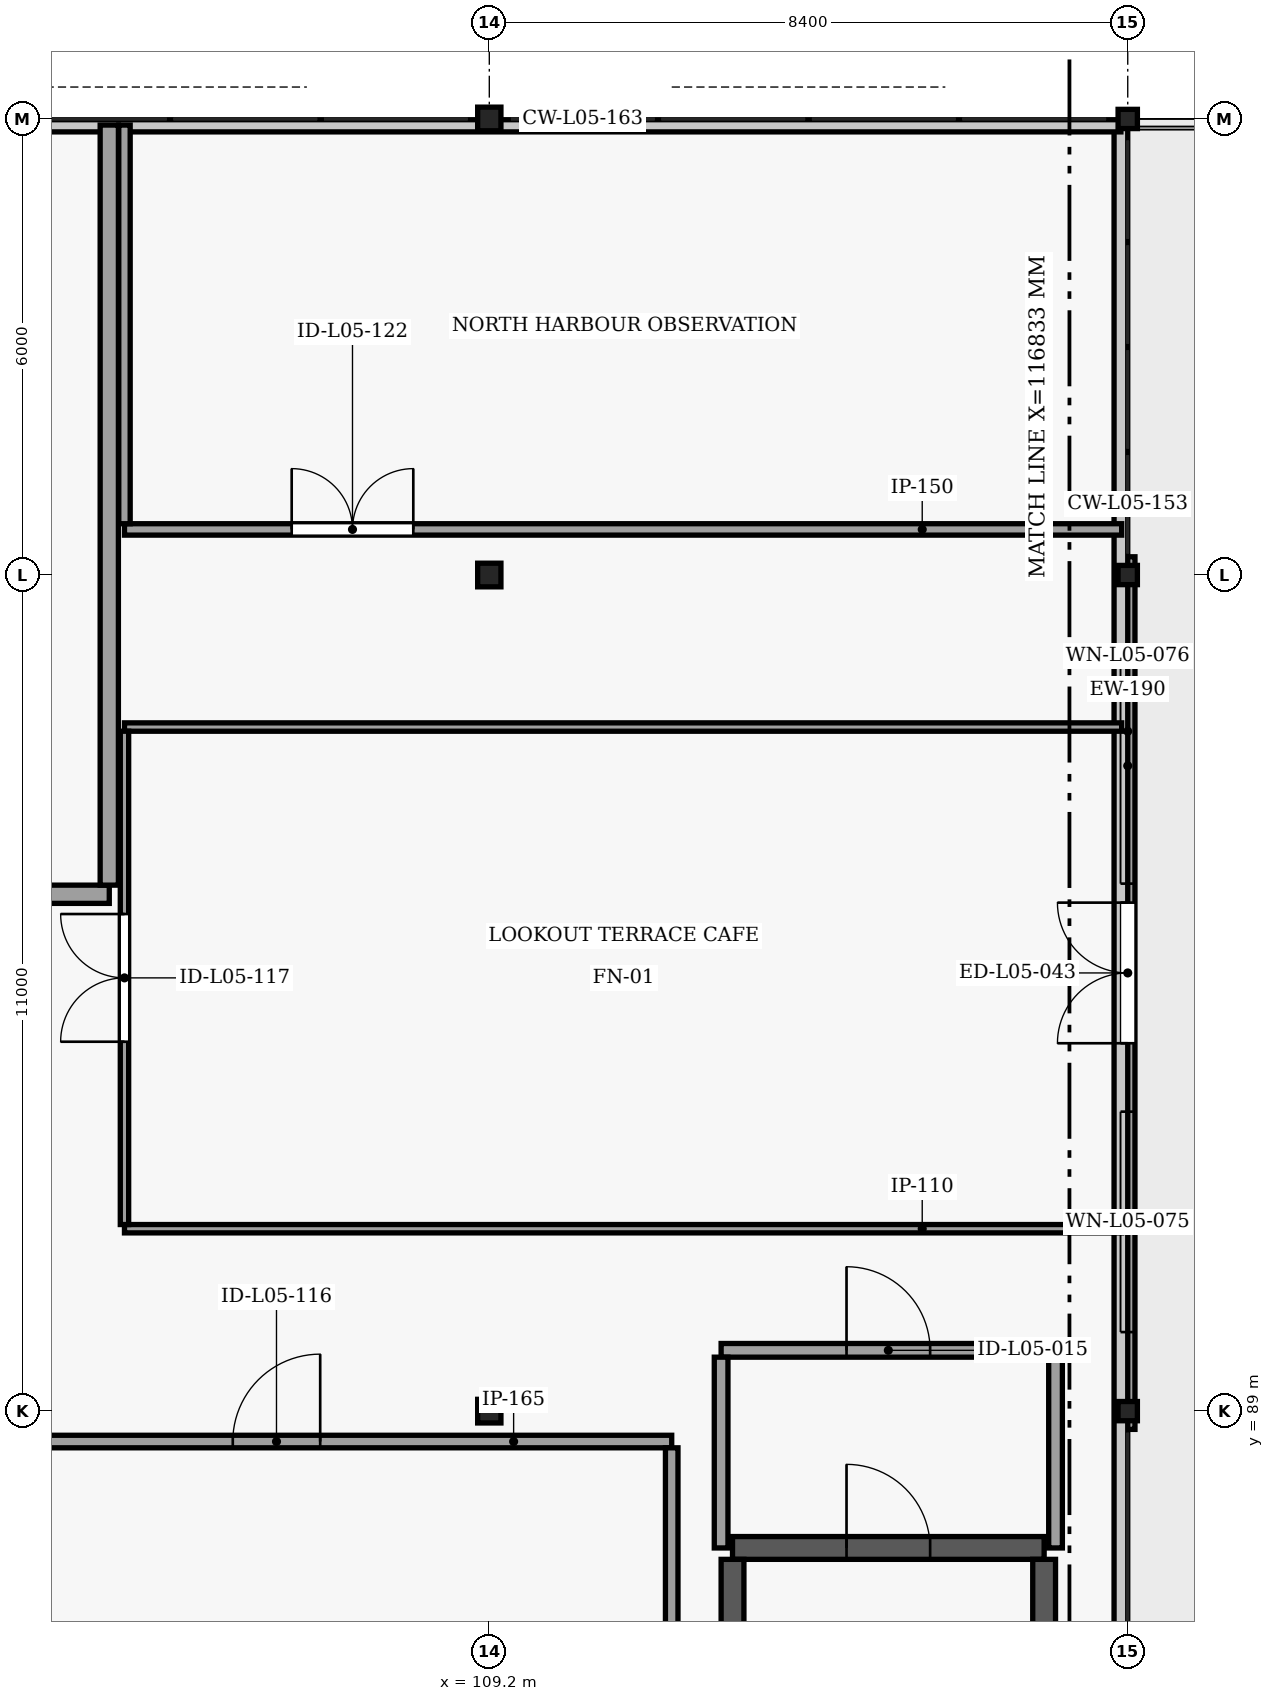
"""IFC4 building model, lengths in metres.
Left out: names, types, materials, properties, quantities, classifications, styles, units other than length and angle.
Written with IfcOpenShell. Run it as: python <this file> out.ifc"""

import sys

from ifc_helpers import new_model, si_unit, direction, frame, frame_2d, origin, origin_2d, place, context, subcontext, project, spatial, rectangle, i_section, extrude, element, fill, save


model = new_model("IFC4")
c1 = context("Model", 3, precision=1e-05, world=origin(), true_north=direction((0.0, 1.0)))
c2 = subcontext(c1, "Body", "Model", "MODEL_VIEW")
j1 = project(units=[si_unit("LENGTHUNIT", "METRE"), si_unit("PLANEANGLEUNIT", "RADIAN")], contexts=[c1])
p1 = place(None, origin())
s1 = spatial("IfcSite", under=j1, at=p1, CompositionType="ELEMENT")
p2 = place(p1, origin())
s2 = spatial("IfcBuilding", under=s1, at=p2, CompositionType="ELEMENT")
p3 = place(p2, frame((0.0, 0.0, 18.6)))
s3 = spatial("IfcBuildingStorey", under=s2, at=p3, CompositionType="ELEMENT", Elevation=18.6)
p4 = place(p3, frame((109.2, 89.0, 0.0), z_axis=(0.0, 0.0, 1.0), x_axis=(1.0, 0.0, 0.0)))
e1 = element("IfcColumn", 1, at=p4, inside=s3, PredefinedType="COLUMN", context=c2, shape_type="SweptSolid", body=[
    extrude(i_section(OverallWidth=0.306, OverallDepth=0.311, WebThickness=0.011, FlangeThickness=0.017, FilletRadius=0.015, at=origin_2d()), origin(), (0.0, 0.0, 1.0), 3.96),
])
p5 = place(p3, frame((117.6, 89.0, 0.0), z_axis=(0.0, 0.0, 1.0), x_axis=(1.0, 0.0, 0.0)))
e2 = element("IfcColumn", 2, at=p5, inside=s3, PredefinedType="COLUMN", context=c2, shape_type="SweptSolid", body=[
    extrude(i_section(OverallWidth=0.254, OverallDepth=0.253, WebThickness=0.009, FlangeThickness=0.014, FilletRadius=0.012, at=origin_2d()), origin(), (0.0, 0.0, 1.0), 3.96),
])
p6 = place(p3, frame((109.2, 100.0, 0.0), z_axis=(0.0, 0.0, 1.0), x_axis=(1.0, 0.0, 0.0)))
e3 = element("IfcColumn", 3, at=p6, inside=s3, PredefinedType="COLUMN", context=c2, shape_type="SweptSolid", body=[
    extrude(i_section(OverallWidth=0.306, OverallDepth=0.311, WebThickness=0.011, FlangeThickness=0.017, FilletRadius=0.015, at=origin_2d()), origin(), (0.0, 0.0, 1.0), 3.96),
])
p7 = place(p3, frame((117.6, 100.0, 0.0), z_axis=(0.0, 0.0, 1.0), x_axis=(1.0, 0.0, 0.0)))
e4 = element("IfcColumn", 4, at=p7, inside=s3, PredefinedType="COLUMN", context=c2, shape_type="SweptSolid", body=[
    extrude(i_section(OverallWidth=0.254, OverallDepth=0.253, WebThickness=0.009, FlangeThickness=0.014, FilletRadius=0.012, at=origin_2d()), origin(), (0.0, 0.0, 1.0), 3.96),
])
p8 = place(p3, frame((109.2, 106.0, 0.0), z_axis=(0.0, 0.0, 1.0), x_axis=(1.0, 0.0, 0.0)))
e5 = element("IfcColumn", 5, at=p8, inside=s3, PredefinedType="COLUMN", context=c2, shape_type="SweptSolid", body=[
    extrude(i_section(OverallWidth=0.306, OverallDepth=0.311, WebThickness=0.011, FlangeThickness=0.017, FilletRadius=0.015, at=origin_2d()), origin(), (0.0, 0.0, 1.0), 3.96),
])
p9 = place(p3, frame((117.6, 106.0, 0.0), z_axis=(0.0, 0.0, 1.0), x_axis=(1.0, 0.0, 0.0)))
e6 = element("IfcColumn", 6, at=p9, inside=s3, PredefinedType="COLUMN", context=c2, shape_type="SweptSolid", body=[
    extrude(i_section(OverallWidth=0.254, OverallDepth=0.253, WebThickness=0.009, FlangeThickness=0.014, FilletRadius=0.012, at=origin_2d()), origin(), (0.0, 0.0, 1.0), 3.96),
])
p10 = place(p3, frame((112.4, 87.2, 0.0), z_axis=(0.0, 0.0, 1.0), x_axis=(1.0, 0.0, 0.0)))
e7 = element("IfcWall", 7, at=p10, inside=s3, PredefinedType="SHEAR", context=c2, shape_type="SweptSolid", body=[
    extrude(rectangle(XDim=4.1, YDim=0.3, at=frame_2d((2.05, 0.0))), origin(), (0.0, 0.0, 1.0), 5.1),
])
p11 = place(p10, frame((1.5, 0.0, 0.0)))
e8 = element("IfcOpeningElement", 8, at=p11, cuts=e7, PredefinedType="OPENING", context=c2, shape_type="SweptSolid", body=[
    extrude(rectangle(XDim=1.1, YDim=2.2, at=frame_2d((0.55, 1.1))), frame((0.0, 0.16, 0.0), z_axis=(0.0, -1.0, 0.0), x_axis=(1.0, 0.0, 0.0)), (0.0, 0.0, 1.0), 0.32),
])
for number, where, z_axis, x_axis in (
    (9, (112.4, 78.35, 0.0), (0.0, 0.0, 1.0), (0.0, 1.0, 0.0)),
    (10, (116.5, 78.35, 0.0), (0.0, 0.0, 1.0), (0.0, 1.0, 0.0)),
):
    element("IfcWall", number, at=place(p3, frame(where, z_axis=z_axis, x_axis=x_axis)), inside=s3, PredefinedType="SHEAR", context=c2, shape_type="SweptSolid", body=[
        extrude(rectangle(XDim=8.7, YDim=0.3, at=frame_2d((4.35, 0.0))), origin(), (0.0, 0.0, 1.0), 5.1),
    ])
p12 = place(p3, frame((117.6, 88.76, 0.0), z_axis=(0.0, 0.0, 1.0), x_axis=(0.0, 1.0, 0.0)))
e11 = element("IfcWall", 11, at=p12, inside=s3, PredefinedType="SOLIDWALL", context=c2, shape_type="SweptSolid", body=[
    extrude(rectangle(XDim=11.48, YDim=0.19, at=frame_2d((5.74, 0.0))), origin(), (0.0, 0.0, 1.0), 3.602),
])
p13 = place(p12, frame((5.08, 0.0, 0.0)))
e12 = element("IfcOpeningElement", 12, at=p13, cuts=e11, PredefinedType="OPENING", context=c2, shape_type="SweptSolid", body=[
    extrude(rectangle(XDim=1.85, YDim=2.26, at=frame_2d((0.925, 1.13))), frame((0.0, 0.105, 0.0), z_axis=(0.0, -1.0, 0.0), x_axis=(1.0, 0.0, 0.0)), (0.0, 0.0, 1.0), 0.21),
])
p14 = place(p12, frame((1.28, 0.0, 0.85)))
e13 = element("IfcOpeningElement", 13, at=p14, cuts=e11, PredefinedType="OPENING", context=c2, shape_type="SweptSolid", body=[
    extrude(rectangle(XDim=2.9, YDim=1.75, at=frame_2d((1.45, 0.875))), frame((0.0, 0.105, 0.0), z_axis=(0.0, -1.0, 0.0), x_axis=(1.0, 0.0, 0.0)), (0.0, 0.0, 1.0), 0.21),
])
p15 = place(p12, frame((7.18, 0.0, 0.85)))
e14 = element("IfcOpeningElement", 14, at=p15, cuts=e11, PredefinedType="OPENING", context=c2, shape_type="SweptSolid", body=[
    extrude(rectangle(XDim=3.1, YDim=1.7, at=frame_2d((1.55, 0.85))), frame((0.0, 0.105, 0.0), z_axis=(0.0, -1.0, 0.0), x_axis=(1.0, 0.0, 0.0)), (0.0, 0.0, 1.0), 0.21),
])
p16 = place(p3, frame((117.51, 78.09, 4.2), z_axis=(0.0, 0.0, 1.0), x_axis=(0.0, 1.0, 0.0)))
e15 = element("IfcWall", 15, at=p16, inside=s3, PredefinedType="PARAPET", context=c2, shape_type="SweptSolid", body=[
    extrude(rectangle(XDim=27.82, YDim=0.18, at=frame_2d((13.91, 0.0))), origin(), (0.0, 0.0, 1.0), 1.2),
])
p17 = place(p3, frame((117.51, 105.91, 4.2), z_axis=(0.0, 0.0, 1.0), x_axis=(-1.0, 0.0, 0.0)))
e16 = element("IfcWall", 16, at=p17, inside=s3, PredefinedType="PARAPET", context=c2, shape_type="SweptSolid", body=[
    extrude(rectangle(XDim=43.42, YDim=0.16, at=frame_2d((21.71, 0.0))), origin(), (0.0, 0.0, 1.0), 1.2),
])
p18 = place(p3, frame((112.25, 89.8, 0.0), z_axis=(0.0, 0.0, 1.0), x_axis=(1.0, 0.0, 0.0)))
e17 = element("IfcWall", 17, at=p18, inside=s3, PredefinedType="SOLIDWALL", context=c2, shape_type="SweptSolid", body=[
    extrude(rectangle(XDim=4.4, YDim=0.18, at=frame_2d((2.2, 0.0))), origin(), (0.0, 0.0, 1.0), 3.9),
])
p19 = place(p18, frame((1.65, 0.0, 0.0)))
e18 = element("IfcOpeningElement", 18, at=p19, cuts=e17, PredefinedType="OPENING", context=c2, shape_type="SweptSolid", body=[
    extrude(rectangle(XDim=1.1, YDim=2.2, at=frame_2d((0.55, 1.1))), frame((0.0, 0.1, 0.0), z_axis=(0.0, -1.0, 0.0), x_axis=(1.0, 0.0, 0.0)), (0.0, 0.0, 1.0), 0.2),
])
for number, where, z_axis, x_axis in (
    (19, (112.25, 87.2, 0.0), (0.0, 0.0, 1.0), (0.0, 1.0, 0.0)),
    (20, (116.65, 87.2, 0.0), (0.0, 0.0, 1.0), (0.0, 1.0, 0.0)),
):
    element("IfcWall", number, at=place(p3, frame(where, z_axis=z_axis, x_axis=x_axis)), inside=s3, PredefinedType="SOLIDWALL", context=c2, shape_type="SweptSolid", body=[
        extrude(rectangle(XDim=2.51, YDim=0.18, at=frame_2d((1.255, 0.0))), origin(), (0.0, 0.0, 1.0), 3.55),
    ])
p20 = place(p3, frame((101.2, 88.6, 0.0), z_axis=(0.0, 0.0, 1.0), x_axis=(1.0, 0.0, 0.0)))
e21 = element("IfcWall", 21, at=p20, inside=s3, PredefinedType="PARTITIONING", context=c2, shape_type="SweptSolid", body=[
    extrude(rectangle(XDim=10.4, YDim=0.165, at=frame_2d((5.2, 0.0))), origin(), (0.0, 0.0, 1.0), 3.604),
])
p21 = place(p20, frame((4.625, 0.0, 0.0)))
e22 = element("IfcOpeningElement", 22, at=p21, cuts=e21, PredefinedType="OPENING", context=c2, shape_type="SweptSolid", body=[
    extrude(rectangle(XDim=1.15, YDim=2.25, at=frame_2d((0.575, 1.125))), frame((0.0, 0.093, 0.0), z_axis=(0.0, -1.0, 0.0), x_axis=(1.0, 0.0, 0.0)), (0.0, 0.0, 1.0), 0.185),
])
p22 = place(p3, frame((111.6, 78.08, 0.0), z_axis=(0.0, 0.0, 1.0), x_axis=(0.0, 1.0, 0.0)))
e23 = element("IfcWall", 23, at=p22, inside=s3, PredefinedType="PARTITIONING", context=c2, shape_type="SweptSolid", body=[
    extrude(rectangle(XDim=10.438, YDim=0.165, at=frame_2d((5.219, 0.0))), origin(), (0.0, 0.0, 1.0), 3.698),
])
for number, where, z_axis, x_axis in (
    (24, (104.4, 91.4, 0.0), (0.0, 0.0, 1.0), (1.0, 0.0, 0.0)),
    (25, (104.4, 98.0, 0.0), (0.0, 0.0, 1.0), (1.0, 0.0, 0.0)),
):
    element("IfcWall", number, at=place(p3, frame(where, z_axis=z_axis, x_axis=x_axis)), inside=s3, PredefinedType="MOVABLE", context=c2, shape_type="SweptSolid", body=[
        extrude(rectangle(XDim=13.12, YDim=0.11, at=frame_2d((6.56, 0.0))), origin(), (0.0, 0.0, 1.0), 3.604),
    ])
p23 = place(p3, frame((104.4, 91.455, 0.0), z_axis=(0.0, 0.0, 1.0), x_axis=(0.0, 1.0, 0.0)))
e26 = element("IfcWall", 26, at=p23, inside=s3, PredefinedType="MOVABLE", context=c2, shape_type="SweptSolid", body=[
    extrude(rectangle(XDim=6.49, YDim=0.11, at=frame_2d((3.245, 0.0))), origin(), (0.0, 0.0, 1.0), 3.698),
])
p24 = place(p23, frame((2.405, 0.0, 0.0)))
e27 = element("IfcOpeningElement", 27, at=p24, cuts=e26, PredefinedType="OPENING", context=c2, shape_type="SweptSolid", body=[
    extrude(rectangle(XDim=1.68, YDim=2.3, at=frame_2d((0.84, 1.15))), frame((0.0, 0.065, 0.0), z_axis=(0.0, -1.0, 0.0), x_axis=(1.0, 0.0, 0.0)), (0.0, 0.0, 1.0), 0.13),
])
p25 = place(p3, frame((96.6, 95.8, 0.0), z_axis=(0.0, 0.0, 1.0), x_axis=(1.0, 0.0, 0.0)))
e28 = element("IfcWall", 28, at=p25, inside=s3, PredefinedType="SOLIDWALL", context=c2, shape_type="SweptSolid", body=[
    extrude(rectangle(XDim=7.6, YDim=0.24, at=frame_2d((3.8, 0.0))), origin(), (0.0, 0.0, 1.0), 3.604),
])
p26 = place(p25, frame((3.05, 0.0, 0.0)))
e29 = element("IfcOpeningElement", 29, at=p26, cuts=e28, PredefinedType="OPENING", context=c2, shape_type="SweptSolid", body=[
    extrude(rectangle(XDim=1.5, YDim=2.25, at=frame_2d((0.75, 1.125))), frame((0.0, 0.13, 0.0), z_axis=(0.0, -1.0, 0.0), x_axis=(1.0, 0.0, 0.0)), (0.0, 0.0, 1.0), 0.26),
])
p27 = place(p3, frame((104.2, 95.92, 0.0), z_axis=(0.0, 0.0, 1.0), x_axis=(0.0, 1.0, 0.0)))
e30 = element("IfcWall", 30, at=p27, inside=s3, PredefinedType="SOLIDWALL", context=c2, shape_type="SweptSolid", body=[
    extrude(rectangle(XDim=10.0, YDim=0.24, at=frame_2d((5.0, 0.0))), origin(), (0.0, 0.0, 1.0), 3.55),
])
p28 = place(p3, frame((104.4, 100.6, 0.0), z_axis=(0.0, 0.0, 1.0), x_axis=(1.0, 0.0, 0.0)))
e31 = element("IfcWall", 31, at=p28, inside=s3, PredefinedType="PARTITIONING", context=c2, shape_type="SweptSolid", body=[
    extrude(rectangle(XDim=13.12, YDim=0.15, at=frame_2d((6.56, 0.0))), origin(), (0.0, 0.0, 1.0), 3.604),
])
p29 = place(p28, frame((2.2, 0.0, 0.0)))
e32 = element("IfcOpeningElement", 32, at=p29, cuts=e31, PredefinedType="OPENING", context=c2, shape_type="SweptSolid", body=[
    extrude(rectangle(XDim=1.6, YDim=2.2, at=frame_2d((0.8, 1.1))), frame((0.0, 0.085, 0.0), z_axis=(0.0, -1.0, 0.0), x_axis=(1.0, 0.0, 0.0)), (0.0, 0.0, 1.0), 0.17),
])
p30 = place(p3, frame((104.4, 100.675, 0.0), z_axis=(0.0, 0.0, 1.0), x_axis=(0.0, 1.0, 0.0)))
e33 = element("IfcWall", 33, at=p30, inside=s3, PredefinedType="PARTITIONING", context=c2, shape_type="SweptSolid", body=[
    extrude(rectangle(XDim=5.245, YDim=0.15, at=frame_2d((2.623, 0.0))), origin(), (0.0, 0.0, 1.0), 3.698),
])
p31 = place(p11, origin())
e34 = element("IfcDoor", 34, at=p31, inside=s3, OperationType="SINGLE_SWING_LEFT", PredefinedType="DOOR", context=c2, shape_type="SweptSolid", body=[
    extrude(rectangle(XDim=1.1, YDim=2.2, at=frame_2d((0.55, 1.1))), frame((0.0, 0.025, 0.0), z_axis=(0.0, -1.0, 0.0), x_axis=(1.0, 0.0, 0.0)), (0.0, 0.0, 1.0), 0.05),
])
fill(e8, e34)
p32 = place(p13, origin())
e35 = element("IfcDoor", 35, at=p32, inside=s3, OperationType="DOUBLE_DOOR_SINGLE_SWING", PredefinedType="DOOR", context=c2, shape_type="SweptSolid", body=[
    extrude(rectangle(XDim=1.85, YDim=2.26, at=frame_2d((0.925, 1.13))), frame((0.0, 0.025, 0.0), z_axis=(0.0, -1.0, 0.0), x_axis=(1.0, 0.0, 0.0)), (0.0, 0.0, 1.0), 0.05),
])
fill(e12, e35)
p33 = place(p14, origin())
e36 = element("IfcWindow", 36, at=p33, inside=s3, PartitioningType="SINGLE_PANEL", PredefinedType="WINDOW", context=c2, shape_type="SweptSolid", body=[
    extrude(rectangle(XDim=2.9, YDim=1.75, at=frame_2d((1.45, 0.875))), frame((0.0, 0.03, 0.0), z_axis=(0.0, -1.0, 0.0), x_axis=(1.0, 0.0, 0.0)), (0.0, 0.0, 1.0), 0.06),
])
fill(e13, e36)
p34 = place(p15, origin())
e37 = element("IfcWindow", 37, at=p34, inside=s3, PartitioningType="SINGLE_PANEL", PredefinedType="WINDOW", context=c2, shape_type="SweptSolid", body=[
    extrude(rectangle(XDim=3.1, YDim=1.7, at=frame_2d((1.55, 0.85))), frame((0.0, 0.03, 0.0), z_axis=(0.0, -1.0, 0.0), x_axis=(1.0, 0.0, 0.0)), (0.0, 0.0, 1.0), 0.06),
])
fill(e14, e37)
p35 = place(p19, origin())
e38 = element("IfcDoor", 38, at=p35, inside=s3, OperationType="SINGLE_SWING_LEFT", PredefinedType="DOOR", context=c2, shape_type="SweptSolid", body=[
    extrude(rectangle(XDim=1.1, YDim=2.2, at=frame_2d((0.55, 1.1))), frame((0.0, 0.025, 0.0), z_axis=(0.0, -1.0, 0.0), x_axis=(1.0, 0.0, 0.0)), (0.0, 0.0, 1.0), 0.05),
])
fill(e18, e38)
p36 = place(p21, origin())
e39 = element("IfcDoor", 39, at=p36, inside=s3, OperationType="SINGLE_SWING_RIGHT", PredefinedType="DOOR", context=c2, shape_type="SweptSolid", body=[
    extrude(rectangle(XDim=1.15, YDim=2.25, at=frame_2d((0.575, 1.125))), frame((0.0, 0.025, 0.0), z_axis=(0.0, -1.0, 0.0), x_axis=(1.0, 0.0, 0.0)), (0.0, 0.0, 1.0), 0.05),
])
fill(e22, e39)
p37 = place(p24, origin())
e40 = element("IfcDoor", 40, at=p37, inside=s3, OperationType="DOUBLE_DOOR_SINGLE_SWING", PredefinedType="DOOR", context=c2, shape_type="SweptSolid", body=[
    extrude(rectangle(XDim=1.68, YDim=2.3, at=frame_2d((0.84, 1.15))), frame((0.0, 0.025, 0.0), z_axis=(0.0, -1.0, 0.0), x_axis=(1.0, 0.0, 0.0)), (0.0, 0.0, 1.0), 0.05),
])
fill(e27, e40)
p38 = place(p29, origin())
e41 = element("IfcDoor", 41, at=p38, inside=s3, OperationType="DOUBLE_DOOR_SINGLE_SWING", PredefinedType="DOOR", context=c2, shape_type="SweptSolid", body=[
    extrude(rectangle(XDim=1.6, YDim=2.2, at=frame_2d((0.8, 1.1))), frame((0.0, 0.025, 0.0), z_axis=(0.0, -1.0, 0.0), x_axis=(1.0, 0.0, 0.0)), (0.0, 0.0, 1.0), 0.05),
])
fill(e32, e41)
save(model, sys.argv[1])
